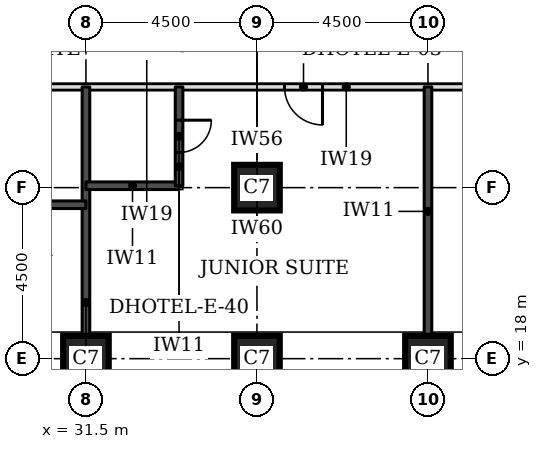
"""IFC4 building model, lengths in metres.
Left out: names, types, materials, properties, quantities, classifications, styles, units other than length and angle.
Written with IfcOpenShell. Run it as: python <this file> out.ifc"""

import sys

from ifc_helpers import new_model, si_unit, direction, frame, frame_2d, origin, origin_2d, place, context, subcontext, project, spatial, rectangle, extrude, element, fill, save


model = new_model("IFC4")
c1 = context("Model", 3, precision=1e-05, world=origin(), true_north=direction((0.0, 1.0)))
c2 = subcontext(c1, "Body", "Model", "MODEL_VIEW")
j1 = project(units=[si_unit("LENGTHUNIT", "METRE"), si_unit("PLANEANGLEUNIT", "RADIAN")], contexts=[c1])
p1 = place(None, origin())
s1 = spatial("IfcSite", under=j1, at=p1, CompositionType="ELEMENT")
p2 = place(p1, origin())
s2 = spatial("IfcBuilding", under=s1, at=p2, CompositionType="ELEMENT")
p3 = place(p2, frame((0.0, 0.0, 62.7)))
s3 = spatial("IfcBuildingStorey", under=s2, at=p3, CompositionType="ELEMENT", Elevation=62.7)
for number, where, z_axis, x_axis in (
    (1, (31.5, 18.0, 0.0), (0.0, 0.0, 1.0), (1.0, 0.0, 0.0)),
    (2, (36.0, 18.0, 0.0), (0.0, 0.0, 1.0), (1.0, 0.0, 0.0)),
    (3, (40.5, 18.0, 0.0), (0.0, 0.0, 1.0), (1.0, 0.0, 0.0)),
    (4, (36.0, 22.5, 0.0), (0.0, 0.0, 1.0), (1.0, 0.0, 0.0)),
):
    element("IfcColumn", number, at=place(p3, frame(where, z_axis=z_axis, x_axis=x_axis)), inside=s3, PredefinedType="COLUMN", context=c2, shape_type="SweptSolid", body=[
        extrude(rectangle(XDim=1.2, YDim=1.2, at=origin_2d()), origin(), (0.0, 0.0, 1.0), 3.3),
    ])
p4 = place(p3, frame((20.65, 25.15, 0.0), z_axis=(0.0, 0.0, 1.0), x_axis=(1.0, 0.0, 0.0)))
e5 = element("IfcWall", 5, at=p4, inside=s3, PredefinedType="PARTITIONING", context=c2, shape_type="SweptSolid", body=[
    extrude(rectangle(XDim=32.2, YDim=0.15, at=frame_2d((16.1, 0.0))), origin(), (0.0, 0.0, 1.0), 3.08),
])
p5 = place(p4, frame((4.375, 0.0, 0.0)))
e6 = element("IfcOpeningElement", 6, at=p5, cuts=e5, PredefinedType="OPENING", context=c2, shape_type="SweptSolid", body=[
    extrude(rectangle(XDim=1.0, YDim=2.1, at=frame_2d((0.5, 1.05))), frame((0.0, 0.085, 0.0), z_axis=(0.0, -1.0, 0.0), x_axis=(1.0, 0.0, 0.0)), (0.0, 0.0, 1.0), 0.17),
])
p6 = place(p4, frame((16.075, 0.0, 0.0)))
e7 = element("IfcOpeningElement", 7, at=p6, cuts=e5, PredefinedType="OPENING", context=c2, shape_type="SweptSolid", body=[
    extrude(rectangle(XDim=1.0, YDim=2.1, at=frame_2d((0.5, 1.05))), frame((0.0, 0.085, 0.0), z_axis=(0.0, -1.0, 0.0), x_axis=(1.0, 0.0, 0.0)), (0.0, 0.0, 1.0), 0.17),
])
p7 = place(p4, frame((22.375, 0.0, 0.0)))
e8 = element("IfcOpeningElement", 8, at=p7, cuts=e5, PredefinedType="OPENING", context=c2, shape_type="SweptSolid", body=[
    extrude(rectangle(XDim=1.0, YDim=2.1, at=frame_2d((0.5, 1.05))), frame((0.0, 0.085, 0.0), z_axis=(0.0, -1.0, 0.0), x_axis=(1.0, 0.0, 0.0)), (0.0, 0.0, 1.0), 0.17),
])
p8 = place(p4, frame((0.425, 0.0, 0.0)))
e9 = element("IfcOpeningElement", 9, at=p8, cuts=e5, PredefinedType="OPENING", context=c2, shape_type="SweptSolid", body=[
    extrude(rectangle(XDim=1.0, YDim=2.1, at=frame_2d((0.5, 1.05))), frame((0.0, 0.085, 0.0), z_axis=(0.0, -1.0, 0.0), x_axis=(1.0, 0.0, 0.0)), (0.0, 0.0, 1.0), 0.17),
])
p9 = place(p4, frame((30.025, 0.0, 0.0)))
e10 = element("IfcOpeningElement", 10, at=p9, cuts=e5, PredefinedType="OPENING", context=c2, shape_type="SweptSolid", body=[
    extrude(rectangle(XDim=1.0, YDim=2.1, at=frame_2d((0.5, 1.05))), frame((0.0, 0.085, 0.0), z_axis=(0.0, -1.0, 0.0), x_axis=(1.0, 0.0, 0.0)), (0.0, 0.0, 1.0), 0.17),
])
for number, where, z_axis, x_axis in (
    (11, (31.5, 18.6, 0.0), (0.0, 0.0, 1.0), (0.0, 1.0, 0.0)),
    (12, (40.5, 18.6, 0.0), (0.0, 0.0, 1.0), (0.0, 1.0, 0.0)),
):
    element("IfcWall", number, at=place(p3, frame(where, z_axis=z_axis, x_axis=x_axis)), inside=s3, PredefinedType="SOLIDWALL", context=c2, shape_type="SweptSolid", body=[
        extrude(rectangle(XDim=6.55, YDim=0.2, at=frame_2d((3.275, 0.0))), origin(), (0.0, 0.0, 1.0), 3.08),
    ])
p10 = place(p3, frame((28.55, 22.05, 0.0), z_axis=(0.0, 0.0, 1.0), x_axis=(1.0, 0.0, 0.0)))
e13 = element("IfcWall", 13, at=p10, inside=s3, PredefinedType="SOLIDWALL", context=c2, shape_type="SweptSolid", body=[
    extrude(rectangle(XDim=2.95, YDim=0.2, at=frame_2d((1.475, 0.0))), origin(), (0.0, 0.0, 1.0), 3.08),
])
p11 = place(p3, frame((31.5, 22.55, 0.0), z_axis=(0.0, 0.0, 1.0), x_axis=(1.0, 0.0, 0.0)))
e14 = element("IfcWall", 14, at=p11, inside=s3, PredefinedType="SOLIDWALL", context=c2, shape_type="SweptSolid", body=[
    extrude(rectangle(XDim=2.45, YDim=0.2, at=frame_2d((1.225, 0.0))), origin(), (0.0, 0.0, 1.0), 3.08),
])
p12 = place(p3, frame((33.95, 22.55, 0.0), z_axis=(0.0, 0.0, 1.0), x_axis=(0.0, 1.0, 0.0)))
e15 = element("IfcWall", 15, at=p12, inside=s3, PredefinedType="SOLIDWALL", context=c2, shape_type="SweptSolid", body=[
    extrude(rectangle(XDim=2.6, YDim=0.2, at=frame_2d((1.3, 0.0))), origin(), (0.0, 0.0, 1.0), 3.08),
])
p13 = place(p12, frame((0.875, 0.0, 0.0)))
e16 = element("IfcOpeningElement", 16, at=p13, cuts=e15, PredefinedType="OPENING", context=c2, shape_type="SweptSolid", body=[
    extrude(rectangle(XDim=0.85, YDim=2.1, at=frame_2d((0.425, 1.05))), frame((0.0, 0.11, 0.0), z_axis=(0.0, -1.0, 0.0), x_axis=(1.0, 0.0, 0.0)), (0.0, 0.0, 1.0), 0.22),
])
p14 = place(p6, frame((1.0, 0.0, 0.0), z_axis=(0.0, 0.0, 1.0), x_axis=(-1.0, 0.0, 0.0)))
e17 = element("IfcDoor", 17, at=p14, inside=s3, OperationType="SINGLE_SWING_LEFT", PredefinedType="DOOR", context=c2, shape_type="SweptSolid", body=[
    extrude(rectangle(XDim=1.0, YDim=2.1, at=frame_2d((0.5, 1.05))), frame((0.0, 0.025, 0.0), z_axis=(0.0, -1.0, 0.0), x_axis=(1.0, 0.0, 0.0)), (0.0, 0.0, 1.0), 0.05),
])
fill(e7, e17)
p15 = place(p13, frame((0.85, 0.0, 0.0), z_axis=(0.0, 0.0, 1.0), x_axis=(-1.0, 0.0, 0.0)))
e18 = element("IfcDoor", 18, at=p15, inside=s3, OperationType="SINGLE_SWING_LEFT", PredefinedType="DOOR", context=c2, shape_type="SweptSolid", body=[
    extrude(rectangle(XDim=0.85, YDim=2.1, at=frame_2d((0.425, 1.05))), frame((0.0, 0.025, 0.0), z_axis=(0.0, -1.0, 0.0), x_axis=(1.0, 0.0, 0.0)), (0.0, 0.0, 1.0), 0.05),
])
fill(e16, e18)
save(model, sys.argv[1])
